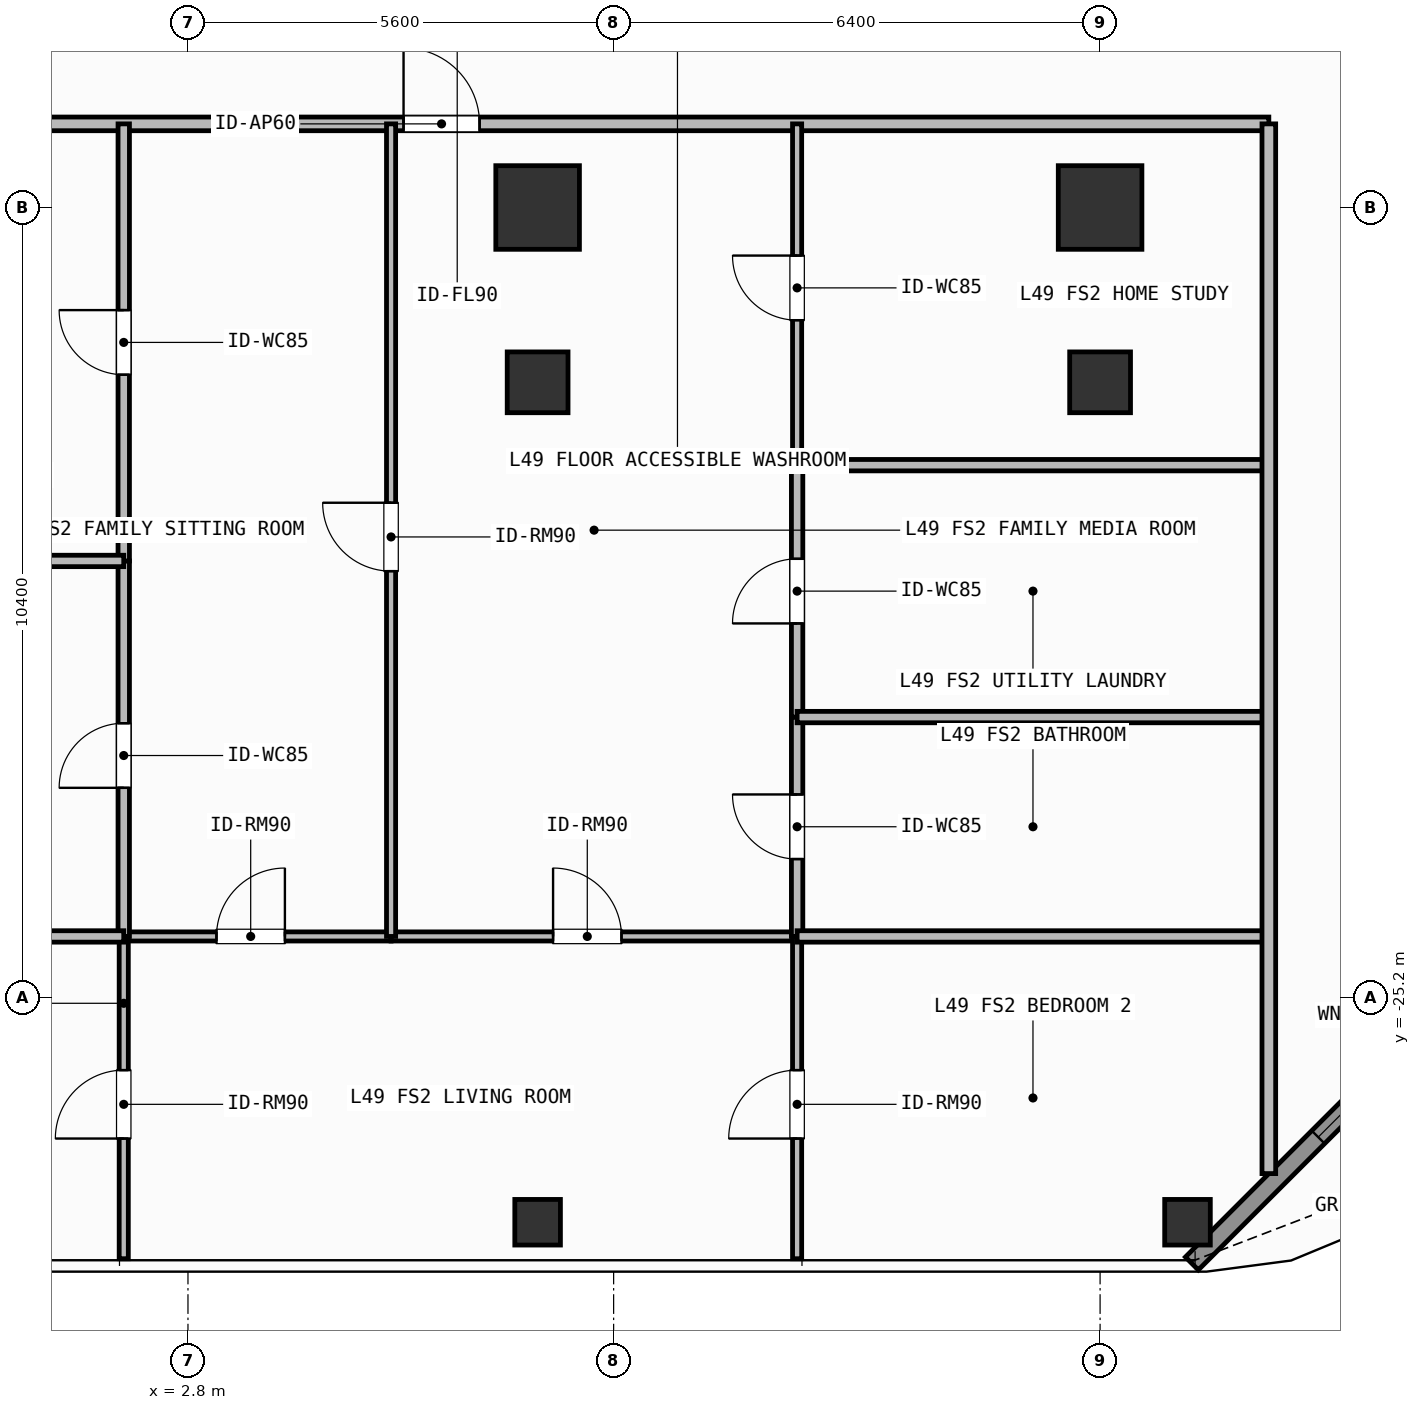
"""IFC4 building model, lengths in metres.
Left out: names, types, materials, properties, quantities, classifications, styles, units other than length and angle.
Written with IfcOpenShell. Run it as: python <this file> out.ifc"""

import sys

from ifc_helpers import new_model, si_unit, direction, frame, frame_2d, origin, origin_2d, place, context, subcontext, project, spatial, rectangle, hollow_rectangle, extrude, element, fill, save


model = new_model("IFC4")
c1 = context("Model", 3, precision=1e-05, world=origin(), true_north=direction((0.0, 1.0)))
c2 = subcontext(c1, "Body", "Model", "MODEL_VIEW")
j1 = project(units=[si_unit("LENGTHUNIT", "METRE"), si_unit("PLANEANGLEUNIT", "RADIAN")], contexts=[c1])
p1 = place(None, origin())
s1 = spatial("IfcSite", under=j1, at=p1, CompositionType="ELEMENT")
p2 = place(p1, origin())
s2 = spatial("IfcBuilding", under=s1, at=p2, CompositionType="ELEMENT")
p3 = place(p2, frame((0.0, 0.0, 199.2)))
s3 = spatial("IfcBuildingStorey", under=s2, at=p3, CompositionType="ELEMENT", Elevation=199.2)
for number, where, z_axis, x_axis in (
    (1, (7.4, -14.8, 0.0), (0.0, 0.0, 1.0), (1.0, 0.0, 0.0)),
    (2, (14.8, -14.8, 0.0), (0.0, 0.0, 1.0), (1.0, 0.0, 0.0)),
):
    element("IfcColumn", number, at=place(p3, frame(where, z_axis=z_axis, x_axis=x_axis)), inside=s3, PredefinedType="COLUMN", context=c2, shape_type="SweptSolid", body=[
        extrude(rectangle(XDim=1.1, YDim=1.1, at=origin_2d()), origin(), (0.0, 0.0, 1.0), 3.9),
    ])
for number, where, z_axis, x_axis in (
    (3, (7.4, -17.1, 0.0), (0.0, 0.0, 1.0), (1.0, 0.0, 0.0)),
    (4, (14.8, -17.1, 0.0), (0.0, 0.0, 1.0), (1.0, 0.0, 0.0)),
):
    element("IfcColumn", number, at=place(p3, frame(where, z_axis=z_axis, x_axis=x_axis)), inside=s3, PredefinedType="COLUMN", context=c2, shape_type="SweptSolid", body=[
        extrude(hollow_rectangle(XDim=0.8, YDim=0.8, WallThickness=0.036, at=origin_2d()), origin(), (0.0, 0.0, 1.0), 3.9),
    ])
for number, where, z_axis, x_axis in (
    (5, (15.95, -28.15, 0.0), (0.0, 0.0, 1.0), (1.0, 0.0, 0.0)),
    (6, (7.4, -28.15, 0.0), (0.0, 0.0, 1.0), (1.0, 0.0, 0.0)),
):
    element("IfcColumn", number, at=place(p3, frame(where, z_axis=z_axis, x_axis=x_axis)), inside=s3, PredefinedType="COLUMN", context=c2, shape_type="SweptSolid", body=[
        extrude(hollow_rectangle(XDim=0.6, YDim=0.6, WallThickness=0.028, at=origin_2d()), origin(), (0.0, 0.0, 1.0), 3.9),
    ])
p4 = place(p3, frame((20.392, -24.308, 0.0), z_axis=(0.0, 0.0, 1.0), x_axis=(-0.707106781187, -0.707106781187, 0.0)))
e7 = element("IfcWall", 7, at=p4, inside=s3, PredefinedType="SOLIDWALL", context=c2, shape_type="SweptSolid", body=[
    extrude(rectangle(XDim=6.201, YDim=0.24, at=frame_2d((3.101, 0.0))), origin(), (0.0, 0.0, 1.0), 3.68),
])
p5 = place(p4, frame((2.351, 0.0, 0.8)))
e8 = element("IfcOpeningElement", 8, at=p5, cuts=e7, PredefinedType="OPENING", context=c2, shape_type="SweptSolid", body=[
    extrude(rectangle(XDim=1.5, YDim=1.85, at=frame_2d((0.75, 0.925))), frame((0.0, 0.13, 0.0), z_axis=(0.0, -1.0, 0.0), x_axis=(1.0, 0.0, 0.0)), (0.0, 0.0, 1.0), 0.26),
])
p6 = place(p3, frame((-4.927, -13.7, 0.0), z_axis=(0.0, 0.0, 1.0), x_axis=(1.0, 0.0, 0.0)))
e9 = element("IfcWall", 9, at=p6, inside=s3, PredefinedType="PARTITIONING", context=c2, shape_type="SweptSolid", body=[
    extrude(rectangle(XDim=21.947, YDim=0.18, at=frame_2d((10.974, 0.0))), origin(), (0.0, 0.0, 1.0), 3.68),
])
p7 = place(p6, frame((10.563, 0.0, 0.0)))
e10 = element("IfcOpeningElement", 10, at=p7, cuts=e9, PredefinedType="OPENING", context=c2, shape_type="SweptSolid", body=[
    extrude(rectangle(XDim=1.0, YDim=2.2, at=frame_2d((0.5, 1.1))), frame((0.0, 0.1, 0.0), z_axis=(0.0, -1.0, 0.0), x_axis=(1.0, 0.0, 0.0)), (0.0, 0.0, 1.0), 0.2),
])
p8 = place(p3, frame((1.955, -24.39, 0.0), z_axis=(0.0, 0.0, 1.0), x_axis=(1.0, 0.0, 0.0)))
e11 = element("IfcWall", 11, at=p8, inside=s3, PredefinedType="PARTITIONING", context=c2, shape_type="SweptSolid", body=[
    extrude(rectangle(XDim=3.517, YDim=0.12, at=frame_2d((1.758, 0.0))), origin(), (0.0, 0.0, 1.0), 3.68),
])
p9 = place(p8, frame((1.22, 0.0, 0.0)))
e12 = element("IfcOpeningElement", 12, at=p9, cuts=e11, PredefinedType="OPENING", context=c2, shape_type="SweptSolid", body=[
    extrude(rectangle(XDim=0.9, YDim=2.1, at=frame_2d((0.45, 1.05))), frame((0.0, 0.07, 0.0), z_axis=(0.0, -1.0, 0.0), x_axis=(1.0, 0.0, 0.0)), (0.0, 0.0, 1.0), 0.14),
])
p10 = place(p3, frame((5.472, -24.39, 0.0), z_axis=(0.0, 0.0, 1.0), x_axis=(1.0, 0.0, 0.0)))
e13 = element("IfcWall", 13, at=p10, inside=s3, PredefinedType="PARTITIONING", context=c2, shape_type="SweptSolid", body=[
    extrude(rectangle(XDim=5.342, YDim=0.12, at=frame_2d((2.671, 0.0))), origin(), (0.0, 0.0, 1.0), 3.68),
])
p11 = place(p10, frame((2.131, 0.0, 0.0)))
e14 = element("IfcOpeningElement", 14, at=p11, cuts=e13, PredefinedType="OPENING", context=c2, shape_type="SweptSolid", body=[
    extrude(rectangle(XDim=0.9, YDim=2.1, at=frame_2d((0.45, 1.05))), frame((0.0, 0.07, 0.0), z_axis=(0.0, -1.0, 0.0), x_axis=(1.0, 0.0, 0.0)), (0.0, 0.0, 1.0), 0.14),
])
p12 = place(p3, frame((5.472, -24.39, 0.0), z_axis=(0.0, 0.0, 1.0), x_axis=(0.0, 1.0, 0.0)))
e15 = element("IfcWall", 15, at=p12, inside=s3, PredefinedType="PARTITIONING", context=c2, shape_type="SweptSolid", body=[
    extrude(rectangle(XDim=10.69, YDim=0.12, at=frame_2d((5.345, 0.0))), origin(), (0.0, 0.0, 1.0), 3.68),
])
p13 = place(p12, frame((4.806, 0.0, 0.0)))
e16 = element("IfcOpeningElement", 16, at=p13, cuts=e15, PredefinedType="OPENING", context=c2, shape_type="SweptSolid", body=[
    extrude(rectangle(XDim=0.9, YDim=2.1, at=frame_2d((0.45, 1.05))), frame((0.0, 0.07, 0.0), z_axis=(0.0, -1.0, 0.0), x_axis=(1.0, 0.0, 0.0)), (0.0, 0.0, 1.0), 0.14),
])
p14 = place(p3, frame((1.955, -24.39, 0.0), z_axis=(0.0, 0.0, 1.0), x_axis=(0.0, 1.0, 0.0)))
e17 = element("IfcWall", 17, at=p14, inside=s3, PredefinedType="PARTITIONING", context=c2, shape_type="SweptSolid", body=[
    extrude(rectangle(XDim=4.94, YDim=0.15, at=frame_2d((2.47, 0.0))), origin(), (0.0, 0.0, 1.0), 3.68),
])
p15 = place(p14, frame((1.955, 0.0, 0.0)))
e18 = element("IfcOpeningElement", 18, at=p15, cuts=e17, PredefinedType="OPENING", context=c2, shape_type="SweptSolid", body=[
    extrude(rectangle(XDim=0.85, YDim=2.1, at=frame_2d((0.425, 1.05))), frame((0.0, 0.085, 0.0), z_axis=(0.0, -1.0, 0.0), x_axis=(1.0, 0.0, 0.0)), (0.0, 0.0, 1.0), 0.17),
])
p16 = place(p3, frame((1.955, -19.45, 0.0), z_axis=(0.0, 0.0, 1.0), x_axis=(0.0, 1.0, 0.0)))
e19 = element("IfcWall", 19, at=p16, inside=s3, PredefinedType="PARTITIONING", context=c2, shape_type="SweptSolid", body=[
    extrude(rectangle(XDim=5.75, YDim=0.15, at=frame_2d((2.875, 0.0))), origin(), (0.0, 0.0, 1.0), 3.68),
])
p17 = place(p16, frame((2.45, 0.0, 0.0)))
e20 = element("IfcOpeningElement", 20, at=p17, cuts=e19, PredefinedType="OPENING", context=c2, shape_type="SweptSolid", body=[
    extrude(rectangle(XDim=0.85, YDim=2.1, at=frame_2d((0.425, 1.05))), frame((0.0, 0.085, 0.0), z_axis=(0.0, -1.0, 0.0), x_axis=(1.0, 0.0, 0.0)), (0.0, 0.0, 1.0), 0.17),
])
p18 = place(p3, frame((1.955, -28.63, 0.0), z_axis=(0.0, 0.0, 1.0), x_axis=(0.0, 1.0, 0.0)))
e21 = element("IfcWall", 21, at=p18, inside=s3, PredefinedType="PARTITIONING", context=c2, shape_type="SweptSolid", body=[
    extrude(rectangle(XDim=4.24, YDim=0.12, at=frame_2d((2.12, 0.0))), origin(), (0.0, 0.0, 1.0), 3.68),
])
p19 = place(p18, frame((1.581, 0.0, 0.0)))
e22 = element("IfcOpeningElement", 22, at=p19, cuts=e21, PredefinedType="OPENING", context=c2, shape_type="SweptSolid", body=[
    extrude(rectangle(XDim=0.9, YDim=2.1, at=frame_2d((0.45, 1.05))), frame((0.0, 0.07, 0.0), z_axis=(0.0, -1.0, 0.0), x_axis=(1.0, 0.0, 0.0)), (0.0, 0.0, 1.0), 0.14),
])
p20 = place(p3, frame((10.814, -24.39, 0.0), z_axis=(0.0, 0.0, 1.0), x_axis=(0.0, 1.0, 0.0)))
e23 = element("IfcWall", 23, at=p20, inside=s3, PredefinedType="PARTITIONING", context=c2, shape_type="SweptSolid", body=[
    extrude(rectangle(XDim=2.886, YDim=0.15, at=frame_2d((1.443, 0.0))), origin(), (0.0, 0.0, 1.0), 3.68),
])
p21 = place(p20, frame((1.018, 0.0, 0.0)))
e24 = element("IfcOpeningElement", 24, at=p21, cuts=e23, PredefinedType="OPENING", context=c2, shape_type="SweptSolid", body=[
    extrude(rectangle(XDim=0.85, YDim=2.1, at=frame_2d((0.425, 1.05))), frame((0.0, 0.085, 0.0), z_axis=(0.0, -1.0, 0.0), x_axis=(1.0, 0.0, 0.0)), (0.0, 0.0, 1.0), 0.17),
])
p22 = place(p3, frame((10.814, -21.504, 0.0), z_axis=(0.0, 0.0, 1.0), x_axis=(0.0, 1.0, 0.0)))
e25 = element("IfcWall", 25, at=p22, inside=s3, PredefinedType="PARTITIONING", context=c2, shape_type="SweptSolid", body=[
    extrude(rectangle(XDim=3.314, YDim=0.15, at=frame_2d((1.657, 0.0))), origin(), (0.0, 0.0, 1.0), 3.68),
])
p23 = place(p22, frame((1.232, 0.0, 0.0)))
e26 = element("IfcOpeningElement", 26, at=p23, cuts=e25, PredefinedType="OPENING", context=c2, shape_type="SweptSolid", body=[
    extrude(rectangle(XDim=0.85, YDim=2.1, at=frame_2d((0.425, 1.05))), frame((0.0, 0.085, 0.0), z_axis=(0.0, -1.0, 0.0), x_axis=(1.0, 0.0, 0.0)), (0.0, 0.0, 1.0), 0.17),
])
p24 = place(p3, frame((10.814, -18.19, 0.0), z_axis=(0.0, 0.0, 1.0), x_axis=(0.0, 1.0, 0.0)))
e27 = element("IfcWall", 27, at=p24, inside=s3, PredefinedType="PARTITIONING", context=c2, shape_type="SweptSolid", body=[
    extrude(rectangle(XDim=4.49, YDim=0.12, at=frame_2d((2.245, 0.0))), origin(), (0.0, 0.0, 1.0), 3.68),
])
p25 = place(p24, frame((1.907, 0.0, 0.0)))
e28 = element("IfcOpeningElement", 28, at=p25, cuts=e27, PredefinedType="OPENING", context=c2, shape_type="SweptSolid", body=[
    extrude(rectangle(XDim=0.85, YDim=2.1, at=frame_2d((0.425, 1.05))), frame((0.0, 0.07, 0.0), z_axis=(0.0, -1.0, 0.0), x_axis=(1.0, 0.0, 0.0)), (0.0, 0.0, 1.0), 0.14),
])
p26 = place(p3, frame((10.814, -28.63, 0.0), z_axis=(0.0, 0.0, 1.0), x_axis=(0.0, 1.0, 0.0)))
e29 = element("IfcWall", 29, at=p26, inside=s3, PredefinedType="PARTITIONING", context=c2, shape_type="SweptSolid", body=[
    extrude(rectangle(XDim=4.24, YDim=0.12, at=frame_2d((2.12, 0.0))), origin(), (0.0, 0.0, 1.0), 3.68),
])
p27 = place(p26, frame((1.581, 0.0, 0.0)))
e30 = element("IfcOpeningElement", 30, at=p27, cuts=e29, PredefinedType="OPENING", context=c2, shape_type="SweptSolid", body=[
    extrude(rectangle(XDim=0.9, YDim=2.1, at=frame_2d((0.45, 1.05))), frame((0.0, 0.07, 0.0), z_axis=(0.0, -1.0, 0.0), x_axis=(1.0, 0.0, 0.0)), (0.0, 0.0, 1.0), 0.14),
])
for number, where, z_axis, x_axis in (
    (31, (-4.927, -19.45, 0.0), (0.0, 0.0, 1.0), (1.0, 0.0, 0.0)),
    (32, (-4.927, -24.39, 0.0), (0.0, 0.0, 1.0), (1.0, 0.0, 0.0)),
):
    element("IfcWall", number, at=place(p3, frame(where, z_axis=z_axis, x_axis=x_axis)), inside=s3, PredefinedType="PARTITIONING", context=c2, shape_type="SweptSolid", body=[
        extrude(rectangle(XDim=6.882, YDim=0.15, at=frame_2d((3.441, 0.0))), origin(), (0.0, 0.0, 1.0), 3.68),
    ])
p28 = place(p3, frame((10.814, -21.504, 0.0), z_axis=(0.0, 0.0, 1.0), x_axis=(1.0, 0.0, 0.0)))
e33 = element("IfcWall", 33, at=p28, inside=s3, PredefinedType="PARTITIONING", context=c2, shape_type="SweptSolid", body=[
    extrude(rectangle(XDim=6.206, YDim=0.15, at=frame_2d((3.103, 0.0))), origin(), (0.0, 0.0, 1.0), 3.42),
])
for number, where, z_axis, x_axis in (
    (34, (10.814, -18.19, 0.0), (0.0, 0.0, 1.0), (1.0, 0.0, 0.0)),
    (35, (10.814, -24.39, 0.0), (0.0, 0.0, 1.0), (1.0, 0.0, 0.0)),
):
    element("IfcWall", number, at=place(p3, frame(where, z_axis=z_axis, x_axis=x_axis)), inside=s3, PredefinedType="PARTITIONING", context=c2, shape_type="SweptSolid", body=[
        extrude(rectangle(XDim=6.206, YDim=0.15, at=frame_2d((3.103, 0.0))), origin(), (0.0, 0.0, 1.0), 3.68),
    ])
p29 = place(p3, frame((17.02, -27.51, 0.0), z_axis=(0.0, 0.0, 1.0), x_axis=(0.0, 1.0, 0.0)))
e36 = element("IfcWall", 36, at=p29, inside=s3, PredefinedType="PARTITIONING", context=c2, shape_type="SweptSolid", body=[
    extrude(rectangle(XDim=13.81, YDim=0.18, at=frame_2d((6.905, 0.0))), origin(), (0.0, 0.0, 1.0), 3.68),
])
p30 = place(p5, origin())
e37 = element("IfcWindow", 37, at=p30, inside=s3, PartitioningType="SINGLE_PANEL", PredefinedType="WINDOW", context=c2, shape_type="SweptSolid", body=[
    extrude(rectangle(XDim=1.5, YDim=1.85, at=frame_2d((0.75, 0.925))), frame((0.0, 0.03, 0.0), z_axis=(0.0, -1.0, 0.0), x_axis=(1.0, 0.0, 0.0)), (0.0, 0.0, 1.0), 0.06),
])
fill(e8, e37)
p31 = place(p7, origin())
e38 = element("IfcDoor", 38, at=p31, inside=s3, OperationType="SINGLE_SWING_LEFT", PredefinedType="DOOR", context=c2, shape_type="SweptSolid", body=[
    extrude(rectangle(XDim=1.0, YDim=2.2, at=frame_2d((0.5, 1.1))), frame((0.0, 0.025, 0.0), z_axis=(0.0, -1.0, 0.0), x_axis=(1.0, 0.0, 0.0)), (0.0, 0.0, 1.0), 0.05),
])
fill(e10, e38)
p32 = place(p9, origin())
e39 = element("IfcDoor", 39, at=p32, inside=s3, OperationType="SINGLE_SWING_RIGHT", PredefinedType="DOOR", context=c2, shape_type="SweptSolid", body=[
    extrude(rectangle(XDim=0.9, YDim=2.1, at=frame_2d((0.45, 1.05))), frame((0.0, 0.025, 0.0), z_axis=(0.0, -1.0, 0.0), x_axis=(1.0, 0.0, 0.0)), (0.0, 0.0, 1.0), 0.05),
])
fill(e12, e39)
p33 = place(p11, origin())
e40 = element("IfcDoor", 40, at=p33, inside=s3, OperationType="SINGLE_SWING_LEFT", PredefinedType="DOOR", context=c2, shape_type="SweptSolid", body=[
    extrude(rectangle(XDim=0.9, YDim=2.1, at=frame_2d((0.45, 1.05))), frame((0.0, 0.025, 0.0), z_axis=(0.0, -1.0, 0.0), x_axis=(1.0, 0.0, 0.0)), (0.0, 0.0, 1.0), 0.05),
])
fill(e14, e40)
p34 = place(p13, origin())
e41 = element("IfcDoor", 41, at=p34, inside=s3, OperationType="SINGLE_SWING_RIGHT", PredefinedType="DOOR", context=c2, shape_type="SweptSolid", body=[
    extrude(rectangle(XDim=0.9, YDim=2.1, at=frame_2d((0.45, 1.05))), frame((0.0, 0.025, 0.0), z_axis=(0.0, -1.0, 0.0), x_axis=(1.0, 0.0, 0.0)), (0.0, 0.0, 1.0), 0.05),
])
fill(e16, e41)
p35 = place(p15, origin())
e42 = element("IfcDoor", 42, at=p35, inside=s3, OperationType="SINGLE_SWING_LEFT", PredefinedType="DOOR", context=c2, shape_type="SweptSolid", body=[
    extrude(rectangle(XDim=0.85, YDim=2.1, at=frame_2d((0.425, 1.05))), frame((0.0, 0.025, 0.0), z_axis=(0.0, -1.0, 0.0), x_axis=(1.0, 0.0, 0.0)), (0.0, 0.0, 1.0), 0.05),
])
fill(e18, e42)
p36 = place(p17, origin())
e43 = element("IfcDoor", 43, at=p36, inside=s3, OperationType="SINGLE_SWING_RIGHT", PredefinedType="DOOR", context=c2, shape_type="SweptSolid", body=[
    extrude(rectangle(XDim=0.85, YDim=2.1, at=frame_2d((0.425, 1.05))), frame((0.0, 0.025, 0.0), z_axis=(0.0, -1.0, 0.0), x_axis=(1.0, 0.0, 0.0)), (0.0, 0.0, 1.0), 0.05),
])
fill(e20, e43)
p37 = place(p19, origin())
e44 = element("IfcDoor", 44, at=p37, inside=s3, OperationType="SINGLE_SWING_LEFT", PredefinedType="DOOR", context=c2, shape_type="SweptSolid", body=[
    extrude(rectangle(XDim=0.9, YDim=2.1, at=frame_2d((0.45, 1.05))), frame((0.0, 0.025, 0.0), z_axis=(0.0, -1.0, 0.0), x_axis=(1.0, 0.0, 0.0)), (0.0, 0.0, 1.0), 0.05),
])
fill(e22, e44)
p38 = place(p21, origin())
e45 = element("IfcDoor", 45, at=p38, inside=s3, OperationType="SINGLE_SWING_RIGHT", PredefinedType="DOOR", context=c2, shape_type="SweptSolid", body=[
    extrude(rectangle(XDim=0.85, YDim=2.1, at=frame_2d((0.425, 1.05))), frame((0.0, 0.025, 0.0), z_axis=(0.0, -1.0, 0.0), x_axis=(1.0, 0.0, 0.0)), (0.0, 0.0, 1.0), 0.05),
])
fill(e24, e45)
p39 = place(p23, origin())
e46 = element("IfcDoor", 46, at=p39, inside=s3, OperationType="SINGLE_SWING_LEFT", PredefinedType="DOOR", context=c2, shape_type="SweptSolid", body=[
    extrude(rectangle(XDim=0.85, YDim=2.1, at=frame_2d((0.425, 1.05))), frame((0.0, 0.025, 0.0), z_axis=(0.0, -1.0, 0.0), x_axis=(1.0, 0.0, 0.0)), (0.0, 0.0, 1.0), 0.05),
])
fill(e26, e46)
p40 = place(p25, origin())
e47 = element("IfcDoor", 47, at=p40, inside=s3, OperationType="SINGLE_SWING_RIGHT", PredefinedType="DOOR", context=c2, shape_type="SweptSolid", body=[
    extrude(rectangle(XDim=0.85, YDim=2.1, at=frame_2d((0.425, 1.05))), frame((0.0, 0.025, 0.0), z_axis=(0.0, -1.0, 0.0), x_axis=(1.0, 0.0, 0.0)), (0.0, 0.0, 1.0), 0.05),
])
fill(e28, e47)
p41 = place(p27, origin())
e48 = element("IfcDoor", 48, at=p41, inside=s3, OperationType="SINGLE_SWING_LEFT", PredefinedType="DOOR", context=c2, shape_type="SweptSolid", body=[
    extrude(rectangle(XDim=0.9, YDim=2.1, at=frame_2d((0.45, 1.05))), frame((0.0, 0.025, 0.0), z_axis=(0.0, -1.0, 0.0), x_axis=(1.0, 0.0, 0.0)), (0.0, 0.0, 1.0), 0.05),
])
fill(e30, e48)
save(model, sys.argv[1])
